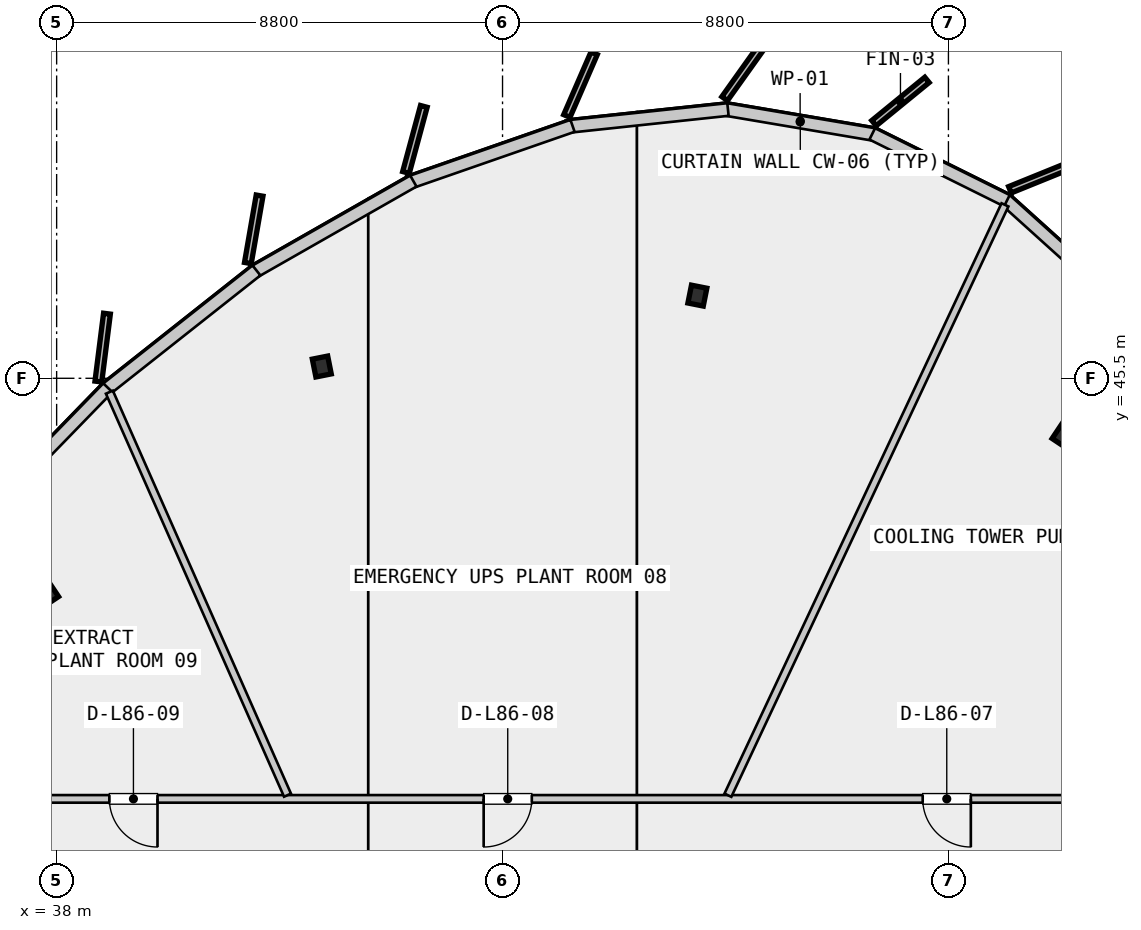
"""IFC4 building model, lengths in metres.
Left out: names, types, materials, properties, quantities, classifications, styles, units other than length and angle.
Written with IfcOpenShell. Run it as: python <this file> out.ifc"""

import sys

from ifc_helpers import new_model, si_unit, direction, frame, frame_2d, origin, origin_2d, place, context, subcontext, project, spatial, rectangle, i_section, extrude, source, transform, mapped, element, fill, save


model = new_model("IFC4")
c1 = context("Model", 3, precision=1e-05, world=origin(), true_north=direction((0.0, 1.0)))
c2 = subcontext(c1, "Body", "Model", "MODEL_VIEW")
j1 = project(units=[si_unit("LENGTHUNIT", "METRE"), si_unit("PLANEANGLEUNIT", "RADIAN")], contexts=[c1])
p1 = place(None, origin())
s1 = spatial("IfcSite", under=j1, at=p1, CompositionType="ELEMENT")
p2 = place(p1, origin())
s2 = spatial("IfcBuilding", under=s1, at=p2, CompositionType="ELEMENT")
p3 = place(p2, frame((0.0, 0.0, 324.3)))
s3 = spatial("IfcBuildingStorey", under=s2, at=p3, CompositionType="ELEMENT", Elevation=324.3)
m1 = source(origin(), c2, "Body", "SweptSolid", [
    extrude(i_section(OverallWidth=0.309, OverallDepth=0.359, WebThickness=0.016, FlangeThickness=0.026, FilletRadius=0.027, at=origin_2d()), origin(), (0.0, 0.0, 1.0), 11.349),
])
p4 = place(p3, frame((57.875, 44.375, 0.0), z_axis=(0.0, 0.0, 1.0), x_axis=(0.55557023302, 0.831469612303, 0.0)))
e1 = element("IfcColumn", 1, at=p4, inside=s3, PredefinedType="COLUMN", context=c2, shape_type="MappedRepresentation", body=[
    mapped(m1, transform((0.0, 0.0, 0.0), scale=1.0)),
])
m2 = source(origin(), c2, "Body", "SweptSolid", [
    extrude(i_section(OverallWidth=0.309, OverallDepth=0.359, WebThickness=0.016, FlangeThickness=0.026, FilletRadius=0.027, at=origin_2d()), origin(), (0.0, 0.0, 1.0), 11.421),
])
p5 = place(p3, frame((50.645, 47.132, 0.0), z_axis=(0.0, 0.0, 1.0), x_axis=(0.195090322016, 0.980785280403, 0.0)))
e2 = element("IfcColumn", 2, at=p5, inside=s3, PredefinedType="COLUMN", context=c2, shape_type="MappedRepresentation", body=[
    mapped(m2, transform((0.0, 0.0, 0.0), scale=1.0)),
])
m3 = source(origin(), c2, "Body", "SweptSolid", [
    extrude(i_section(OverallWidth=0.309, OverallDepth=0.359, WebThickness=0.016, FlangeThickness=0.026, FilletRadius=0.027, at=origin_2d()), origin(), (0.0, 0.0, 1.0), 10.751),
])
p6 = place(p3, frame((43.233, 45.732, 0.0), z_axis=(0.0, 0.0, 1.0), x_axis=(-0.195090322016, 0.980785280403, 0.0)))
e3 = element("IfcColumn", 3, at=p6, inside=s3, PredefinedType="COLUMN", context=c2, shape_type="MappedRepresentation", body=[
    mapped(m3, transform((0.0, 0.0, 0.0), scale=1.0)),
])
m4 = source(origin(), c2, "Body", "SweptSolid", [
    extrude(i_section(OverallWidth=0.309, OverallDepth=0.359, WebThickness=0.016, FlangeThickness=0.026, FilletRadius=0.027, at=origin_2d()), origin(), (0.0, 0.0, 1.0), 9.653),
])
p7 = place(p3, frame((37.81, 41.255, 0.0), z_axis=(0.0, 0.0, 1.0), x_axis=(-0.55557023302, 0.831469612303, 0.0)))
e4 = element("IfcColumn", 4, at=p7, inside=s3, PredefinedType="COLUMN", context=c2, shape_type="MappedRepresentation", body=[
    mapped(m4, transform((0.0, 0.0, 0.0), scale=1.0)),
])
p8 = place(p3, frame((54.136, 50.311, 12.135), z_axis=(0.0, 0.0, 1.0), x_axis=(-0.985999627686, 0.166747516335, 0.0)))
e5 = element("IfcWall", 5, at=p8, inside=s3, PredefinedType="PARAPET", context=c2, shape_type="SweptSolid", body=[
    extrude(rectangle(XDim=2.966, YDim=0.25, at=frame_2d((1.483, 0.0))), origin(), (0.0, 0.0, 1.0), 0.06),
])
p9 = place(p3, frame((51.249, 50.804, 11.9), z_axis=(0.0, 0.0, 1.0), x_axis=(-0.994398903958, -0.105692099073, 0.0)))
e6 = element("IfcWall", 6, at=p9, inside=s3, PredefinedType="PARAPET", context=c2, shape_type="SweptSolid", body=[
    extrude(rectangle(XDim=3.116, YDim=0.25, at=frame_2d((1.558, 0.0))), origin(), (0.0, 0.0, 1.0), 0.137),
])
p10 = place(p3, frame((48.181, 50.482, 11.526), z_axis=(0.0, 0.0, 1.0), x_axis=(-0.944531198591, -0.328421702827, 0.0)))
e7 = element("IfcWall", 7, at=p10, inside=s3, PredefinedType="PARAPET", context=c2, shape_type="SweptSolid", body=[
    extrude(rectangle(XDim=3.35, YDim=0.25, at=frame_2d((1.675, 0.0))), origin(), (0.0, 0.0, 1.0), 0.207),
])
p11 = place(p3, frame((45.04, 49.392, 11.035), z_axis=(0.0, 0.0, 1.0), x_axis=(-0.86872891794, -0.495287862898, 0.0)))
e8 = element("IfcWall", 8, at=p11, inside=s3, PredefinedType="PARAPET", context=c2, shape_type="SweptSolid", body=[
    extrude(rectangle(XDim=3.584, YDim=0.25, at=frame_2d((1.792, 0.0))), origin(), (0.0, 0.0, 1.0), 0.265),
])
p12 = place(p3, frame((41.944, 47.628, 10.458), z_axis=(0.0, 0.0, 1.0), x_axis=(-0.784641383656, -0.619949916569, 0.0)))
e9 = element("IfcWall", 9, at=p12, inside=s3, PredefinedType="PARAPET", context=c2, shape_type="SweptSolid", body=[
    extrude(rectangle(XDim=3.755, YDim=0.25, at=frame_2d((1.877, 0.0))), origin(), (0.0, 0.0, 1.0), 0.309),
])
p13 = place(p3, frame((39.011, 45.313, 9.822), z_axis=(0.0, 0.0, 1.0), x_axis=(-0.69680348459, -0.717262088684, 0.0)))
e10 = element("IfcWall", 10, at=p13, inside=s3, PredefinedType="PARAPET", context=c2, shape_type="SweptSolid", body=[
    extrude(rectangle(XDim=3.831, YDim=0.25, at=frame_2d((1.915, 0.0))), origin(), (0.0, 0.0, 1.0), 0.338),
])
p14 = place(p3, frame((59.035, 46.938, 11.9), z_axis=(0.0, 0.0, 1.0), x_axis=(-0.742338940016, 0.670024550398, 0.0)))
e11 = element("IfcWall", 11, at=p14, inside=s3, PredefinedType="PARAPET", context=c2, shape_type="SweptSolid", body=[
    extrude(rectangle(XDim=3.116, YDim=0.25, at=frame_2d((1.558, 0.0))), origin(), (0.0, 0.0, 1.0), 0.137),
])
p15 = place(p3, frame((56.754, 49.004, 12.135), z_axis=(0.0, 0.0, 1.0), x_axis=(-0.895723826452, 0.444610871129, 0.0)))
e12 = element("IfcWall", 12, at=p15, inside=s3, PredefinedType="PARAPET", context=c2, shape_type="SweptSolid", body=[
    extrude(rectangle(XDim=2.966, YDim=0.25, at=frame_2d((1.483, 0.0))), origin(), (0.0, 0.0, 1.0), 0.06),
])
p16 = place(p3, frame((60.5, 37.2, 0.0), z_axis=(0.0, 0.0, 1.0), x_axis=(-1.0, 0.0, 0.0)))
e13 = element("IfcWall", 13, at=p16, inside=s3, PredefinedType="PARTITIONING", context=c2, shape_type="SweptSolid", body=[
    extrude(rectangle(XDim=27.4, YDim=0.15, at=frame_2d((13.7, 0.0))), origin(), (0.0, 0.0, 1.0), 3.49),
])
p17 = place(p16, frame((4.458, 0.0, 0.0)))
e14 = element("IfcOpeningElement", 14, at=p17, cuts=e13, PredefinedType="OPENING", context=c2, shape_type="SweptSolid", body=[
    extrude(rectangle(XDim=0.95, YDim=2.15, at=frame_2d((0.475, 1.075))), frame((0.0, 0.085, 0.0), z_axis=(0.0, -1.0, 0.0), x_axis=(1.0, 0.0, 0.0)), (0.0, 0.0, 1.0), 0.17),
])
p18 = place(p16, frame((13.122, 0.0, 0.0)))
e15 = element("IfcOpeningElement", 15, at=p18, cuts=e13, PredefinedType="OPENING", context=c2, shape_type="SweptSolid", body=[
    extrude(rectangle(XDim=0.95, YDim=2.15, at=frame_2d((0.475, 1.075))), frame((0.0, 0.085, 0.0), z_axis=(0.0, -1.0, 0.0), x_axis=(1.0, 0.0, 0.0)), (0.0, 0.0, 1.0), 0.17),
])
p19 = place(p16, frame((20.51, 0.0, 0.0)))
e16 = element("IfcOpeningElement", 16, at=p19, cuts=e13, PredefinedType="OPENING", context=c2, shape_type="SweptSolid", body=[
    extrude(rectangle(XDim=0.95, YDim=2.15, at=frame_2d((0.475, 1.075))), frame((0.0, 0.085, 0.0), z_axis=(0.0, -1.0, 0.0), x_axis=(1.0, 0.0, 0.0)), (0.0, 0.0, 1.0), 0.17),
])
p20 = place(p3, frame((51.248, 37.272, 0.0), z_axis=(0.0, 0.0, 1.0), x_axis=(0.424864941596, 0.905256748885, 0.0)))
e17 = element("IfcWall", 17, at=p20, inside=s3, PredefinedType="PARTITIONING", context=c2, shape_type="SweptSolid", body=[
    extrude(rectangle(XDim=12.869, YDim=0.15, at=frame_2d((6.435, 0.0))), origin(), (0.0, 0.0, 1.0), 3.49),
])
p21 = place(p3, frame((42.556, 37.273, 0.0), z_axis=(0.0, 0.0, 1.0), x_axis=(-0.404280205645, 0.914635181547, 0.0)))
e18 = element("IfcWall", 18, at=p21, inside=s3, PredefinedType="PARTITIONING", context=c2, shape_type="SweptSolid", body=[
    extrude(rectangle(XDim=8.695, YDim=0.15, at=frame_2d((4.348, 0.0))), origin(), (0.0, 0.0, 1.0), 3.49),
])
m5 = source(origin(), c2, "Body", "SweptSolid", [
    extrude(rectangle(XDim=0.95, YDim=2.15, at=frame_2d((0.475, 1.075))), frame((0.0, 0.025, 0.0), z_axis=(0.0, -1.0, 0.0), x_axis=(1.0, 0.0, 0.0)), (0.0, 0.0, 1.0), 0.05),
])
p22 = place(p17, origin())
e19 = element("IfcDoor", 19, at=p22, inside=s3, OperationType="SINGLE_SWING_LEFT", PredefinedType="DOOR", context=c2, shape_type="MappedRepresentation", body=[
    mapped(m5, transform((0.0, 0.0, 0.0), scale=1.0)),
])
fill(e14, e19)
p23 = place(p18, origin())
e20 = element("IfcDoor", 20, at=p23, inside=s3, OperationType="SINGLE_SWING_RIGHT", PredefinedType="DOOR", context=c2, shape_type="MappedRepresentation", body=[
    mapped(m5, transform((0.0, 0.0, 0.0), scale=1.0)),
])
fill(e15, e20)
p24 = place(p19, origin())
e21 = element("IfcDoor", 21, at=p24, inside=s3, OperationType="SINGLE_SWING_LEFT", PredefinedType="DOOR", context=c2, shape_type="MappedRepresentation", body=[
    mapped(m5, transform((0.0, 0.0, 0.0), scale=1.0)),
])
fill(e16, e21)
save(model, sys.argv[1])
